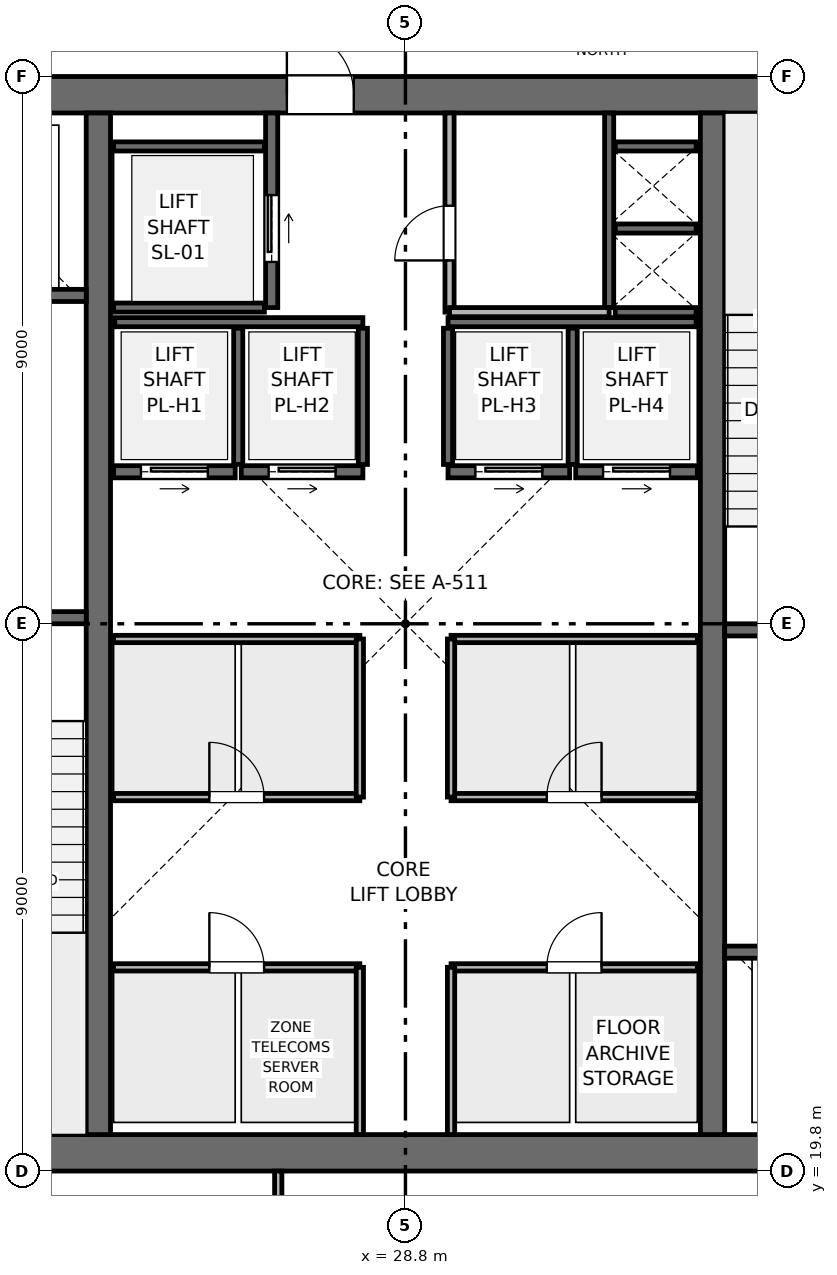
"""IFC4 building model, lengths in metres.
Left out: names, types, materials, properties, quantities, classifications, styles, units other than length and angle.
Written with IfcOpenShell. Run it as: python <this file> out.ifc"""

import sys

from ifc_helpers import new_model, si_unit, direction, frame, frame_2d, origin, place, context, subcontext, project, spatial, rectangle, extrude, element, fill, save


model = new_model("IFC4")
c1 = context("Model", 3, precision=1e-05, world=origin(), true_north=direction((0.0, 1.0)))
c2 = subcontext(c1, "Body", "Model", "MODEL_VIEW")
j1 = project(units=[si_unit("LENGTHUNIT", "METRE"), si_unit("PLANEANGLEUNIT", "RADIAN")], contexts=[c1])
p1 = place(None, origin())
s1 = spatial("IfcSite", under=j1, at=p1, CompositionType="ELEMENT")
p2 = place(p1, origin())
s2 = spatial("IfcBuilding", under=s1, at=p2, CompositionType="ELEMENT")
p3 = place(p2, frame((0.0, 0.0, 355.5)))
s3 = spatial("IfcBuildingStorey", under=s2, at=p3, CompositionType="ELEMENT", Elevation=355.5)
p4 = place(p3, frame((19.8, 20.1, 0.0), z_axis=(0.0, 0.0, 1.0), x_axis=(1.0, 0.0, 0.0)))
e1 = element("IfcWall", 1, at=p4, inside=s3, PredefinedType="SHEAR", context=c2, shape_type="SweptSolid", body=[
    extrude(rectangle(XDim=18.0, YDim=0.6, at=frame_2d((9.0, 0.0))), origin(), (0.0, 0.0, 1.0), 4.5),
])
p5 = place(p3, frame((19.8, 37.5, 0.0), z_axis=(0.0, 0.0, 1.0), x_axis=(1.0, 0.0, 0.0)))
e2 = element("IfcWall", 2, at=p5, inside=s3, PredefinedType="SHEAR", context=c2, shape_type="SweptSolid", body=[
    extrude(rectangle(XDim=18.0, YDim=0.6, at=frame_2d((9.0, 0.0))), origin(), (0.0, 0.0, 1.0), 4.5),
])
p6 = place(p5, frame((7.05, 0.0, 0.0)))
e3 = element("IfcOpeningElement", 3, at=p6, cuts=e2, PredefinedType="OPENING", context=c2, shape_type="SweptSolid", body=[
    extrude(rectangle(XDim=1.1, YDim=2.15, at=frame_2d((0.55, 1.075))), frame((0.0, 0.31, 0.0), z_axis=(0.0, -1.0, 0.0), x_axis=(1.0, 0.0, 0.0)), (0.0, 0.0, 1.0), 0.62),
])
for number, where, z_axis, x_axis in (
    (4, (23.75, 20.4, 0.0), (0.0, 0.0, 1.0), (0.0, 1.0, 0.0)),
    (5, (33.85, 20.4, 0.0), (0.0, 0.0, 1.0), (0.0, 1.0, 0.0)),
):
    element("IfcWall", number, at=place(p3, frame(where, z_axis=z_axis, x_axis=x_axis)), inside=s3, PredefinedType="SHEAR", context=c2, shape_type="SweptSolid", body=[
        extrude(rectangle(XDim=16.8, YDim=0.4, at=frame_2d((8.4, 0.0))), origin(), (0.0, 0.0, 1.0), 4.5),
    ])
p7 = place(p3, frame((20.4, 28.9, 0.0), z_axis=(0.0, 0.0, 1.0), x_axis=(1.0, 0.0, 0.0)))
e6 = element("IfcWall", 6, at=p7, inside=s3, PredefinedType="SHEAR", context=c2, shape_type="SweptSolid", body=[
    extrude(rectangle(XDim=3.15, YDim=0.2, at=frame_2d((1.575, 0.0))), origin(), (0.0, 0.0, 1.0), 4.24),
])
p8 = place(p7, frame((0.8, 0.0, 0.0)))
e7 = element("IfcOpeningElement", 7, at=p8, cuts=e6, PredefinedType="OPENING", context=c2, shape_type="SweptSolid", body=[
    extrude(rectangle(XDim=1.0, YDim=2.1, at=frame_2d((0.5, 1.05))), frame((0.0, 0.11, 0.0), z_axis=(0.0, -1.0, 0.0), x_axis=(1.0, 0.0, 0.0)), (0.0, 0.0, 1.0), 0.22),
])
p9 = place(p3, frame((34.05, 28.7, 0.0), z_axis=(0.0, 0.0, 1.0), x_axis=(1.0, 0.0, 0.0)))
e8 = element("IfcWall", 8, at=p9, inside=s3, PredefinedType="SHEAR", context=c2, shape_type="SweptSolid", body=[
    extrude(rectangle(XDim=3.15, YDim=0.2, at=frame_2d((1.575, 0.0))), origin(), (0.0, 0.0, 1.0), 4.24),
])
p10 = place(p9, frame((0.8, 0.0, 0.0)))
e9 = element("IfcOpeningElement", 9, at=p10, cuts=e8, PredefinedType="OPENING", context=c2, shape_type="SweptSolid", body=[
    extrude(rectangle(XDim=1.0, YDim=2.1, at=frame_2d((0.5, 1.05))), frame((0.0, 0.11, 0.0), z_axis=(0.0, -1.0, 0.0), x_axis=(1.0, 0.0, 0.0)), (0.0, 0.0, 1.0), 0.22),
])
p11 = place(p3, frame((32.15, 34.0, 0.0), z_axis=(0.0, 0.0, 1.0), x_axis=(0.0, 1.0, 0.0)))
e10 = element("IfcWall", 10, at=p11, inside=s3, PredefinedType="SHEAR", context=c2, shape_type="SweptSolid", body=[
    extrude(rectangle(XDim=3.2, YDim=0.15, at=frame_2d((1.6, 0.0))), origin(), (0.0, 0.0, 1.0), 4.24),
])
for number, where, z_axis, x_axis in (
    (11, (32.25, 33.925, 0.0), (0.0, 0.0, 1.0), (1.0, 0.0, 0.0)),
    (12, (32.25, 35.3, 0.0), (0.0, 0.0, 1.0), (1.0, 0.0, 0.0)),
):
    element("IfcWall", number, at=place(p3, frame(where, z_axis=z_axis, x_axis=x_axis)), inside=s3, PredefinedType="SHEAR", context=c2, shape_type="SweptSolid", body=[
        extrude(rectangle(XDim=1.33, YDim=0.15, at=frame_2d((0.665, 0.0))), origin(), (0.0, 0.0, 1.0), 4.24),
    ])
p12 = place(p3, frame((20.5, 34.2, 0.0), z_axis=(0.0, 0.0, 1.0), x_axis=(1.0, 0.0, 0.0)))
e13 = element("IfcWall", 13, at=p12, inside=s3, PredefinedType="SHEAR", context=c2, shape_type="SweptSolid", body=[
    extrude(rectangle(XDim=3.05, YDim=0.2, at=frame_2d((1.525, 0.0))), origin(), (0.0, 0.0, 1.0), 4.24),
])
p13 = place(p12, frame((0.75, 0.0, 0.0)))
e14 = element("IfcOpeningElement", 14, at=p13, cuts=e13, PredefinedType="OPENING", context=c2, shape_type="SweptSolid", body=[
    extrude(rectangle(XDim=1.1, YDim=2.15, at=frame_2d((0.55, 1.075))), frame((0.0, 0.11, 0.0), z_axis=(0.0, -1.0, 0.0), x_axis=(1.0, 0.0, 0.0)), (0.0, 0.0, 1.0), 0.22),
])
p14 = place(p3, frame((34.05, 23.4, 0.0), z_axis=(0.0, 0.0, 1.0), x_axis=(1.0, 0.0, 0.0)))
e15 = element("IfcWall", 15, at=p14, inside=s3, PredefinedType="SHEAR", context=c2, shape_type="SweptSolid", body=[
    extrude(rectangle(XDim=3.05, YDim=0.2, at=frame_2d((1.525, 0.0))), origin(), (0.0, 0.0, 1.0), 4.24),
])
p15 = place(p14, frame((1.2, 0.0, 0.0)))
e16 = element("IfcOpeningElement", 16, at=p15, cuts=e15, PredefinedType="OPENING", context=c2, shape_type="SweptSolid", body=[
    extrude(rectangle(XDim=1.1, YDim=2.15, at=frame_2d((0.55, 1.075))), frame((0.0, 0.11, 0.0), z_axis=(0.0, -1.0, 0.0), x_axis=(1.0, 0.0, 0.0)), (0.0, 0.0, 1.0), 0.22),
])
p16 = place(p3, frame((26.6, 34.0, 0.0), z_axis=(0.0, 0.0, 1.0), x_axis=(0.0, 1.0, 0.0)))
e17 = element("IfcWall", 17, at=p16, inside=s3, PredefinedType="SHEAR", context=c2, shape_type="SweptSolid", body=[
    extrude(rectangle(XDim=3.2, YDim=0.2, at=frame_2d((1.6, 0.0))), origin(), (0.0, 0.0, 1.0), 4.24),
])
p17 = place(p16, frame((0.75, 0.0, 0.0)))
e18 = element("IfcOpeningElement", 18, at=p17, cuts=e17, PredefinedType="OPENING", context=c2, shape_type="SweptSolid", body=[
    extrude(rectangle(XDim=1.1, YDim=2.15, at=frame_2d((0.55, 1.075))), frame((0.0, 0.11, 0.0), z_axis=(0.0, -1.0, 0.0), x_axis=(1.0, 0.0, 0.0)), (0.0, 0.0, 1.0), 0.22),
])
for number, where, z_axis, x_axis in (
    (19, (24.0, 34.0, 0.0), (0.0, 0.0, 1.0), (1.0, 0.0, 0.0)),
    (20, (24.0, 36.65, 0.0), (0.0, 0.0, 1.0), (1.0, 0.0, 0.0)),
):
    element("IfcWall", number, at=place(p3, frame(where, z_axis=z_axis, x_axis=x_axis)), inside=s3, PredefinedType="SHEAR", context=c2, shape_type="SweptSolid", body=[
        extrude(rectangle(XDim=2.48, YDim=0.15, at=frame_2d((1.24, 0.0))), origin(), (0.0, 0.0, 1.0), 4.24),
    ])
p18 = place(p3, frame((24.0, 31.3, 0.0), z_axis=(0.0, 0.0, 1.0), x_axis=(1.0, 0.0, 0.0)))
e21 = element("IfcWall", 21, at=p18, inside=s3, PredefinedType="SHEAR", context=c2, shape_type="SweptSolid", body=[
    extrude(rectangle(XDim=2.0, YDim=0.2, at=frame_2d((1.0, 0.0))), origin(), (0.0, 0.0, 1.0), 4.24),
])
p19 = place(p18, frame((0.45, 0.0, 0.0)))
e22 = element("IfcOpeningElement", 22, at=p19, cuts=e21, PredefinedType="OPENING", context=c2, shape_type="SweptSolid", body=[
    extrude(rectangle(XDim=1.1, YDim=2.15, at=frame_2d((0.55, 1.075))), frame((0.0, 0.11, 0.0), z_axis=(0.0, -1.0, 0.0), x_axis=(1.0, 0.0, 0.0)), (0.0, 0.0, 1.0), 0.22),
])
p20 = place(p3, frame((26.1, 31.3, 0.0), z_axis=(0.0, 0.0, 1.0), x_axis=(1.0, 0.0, 0.0)))
e23 = element("IfcWall", 23, at=p20, inside=s3, PredefinedType="SHEAR", context=c2, shape_type="SweptSolid", body=[
    extrude(rectangle(XDim=2.0, YDim=0.2, at=frame_2d((1.0, 0.0))), origin(), (0.0, 0.0, 1.0), 4.24),
])
p21 = place(p20, frame((0.45, 0.0, 0.0)))
e24 = element("IfcOpeningElement", 24, at=p21, cuts=e23, PredefinedType="OPENING", context=c2, shape_type="SweptSolid", body=[
    extrude(rectangle(XDim=1.1, YDim=2.15, at=frame_2d((0.55, 1.075))), frame((0.0, 0.11, 0.0), z_axis=(0.0, -1.0, 0.0), x_axis=(1.0, 0.0, 0.0)), (0.0, 0.0, 1.0), 0.22),
])
p22 = place(p3, frame((29.5, 31.3, 0.0), z_axis=(0.0, 0.0, 1.0), x_axis=(1.0, 0.0, 0.0)))
e25 = element("IfcWall", 25, at=p22, inside=s3, PredefinedType="SHEAR", context=c2, shape_type="SweptSolid", body=[
    extrude(rectangle(XDim=2.0, YDim=0.2, at=frame_2d((1.0, 0.0))), origin(), (0.0, 0.0, 1.0), 4.24),
])
p23 = place(p22, frame((0.45, 0.0, 0.0)))
e26 = element("IfcOpeningElement", 26, at=p23, cuts=e25, PredefinedType="OPENING", context=c2, shape_type="SweptSolid", body=[
    extrude(rectangle(XDim=1.1, YDim=2.15, at=frame_2d((0.55, 1.075))), frame((0.0, 0.11, 0.0), z_axis=(0.0, -1.0, 0.0), x_axis=(1.0, 0.0, 0.0)), (0.0, 0.0, 1.0), 0.22),
])
p24 = place(p3, frame((31.6, 31.3, 0.0), z_axis=(0.0, 0.0, 1.0), x_axis=(1.0, 0.0, 0.0)))
e27 = element("IfcWall", 27, at=p24, inside=s3, PredefinedType="SHEAR", context=c2, shape_type="SweptSolid", body=[
    extrude(rectangle(XDim=2.0, YDim=0.2, at=frame_2d((1.0, 0.0))), origin(), (0.0, 0.0, 1.0), 4.24),
])
p25 = place(p24, frame((0.45, 0.0, 0.0)))
e28 = element("IfcOpeningElement", 28, at=p25, cuts=e27, PredefinedType="OPENING", context=c2, shape_type="SweptSolid", body=[
    extrude(rectangle(XDim=1.1, YDim=2.15, at=frame_2d((0.55, 1.075))), frame((0.0, 0.11, 0.0), z_axis=(0.0, -1.0, 0.0), x_axis=(1.0, 0.0, 0.0)), (0.0, 0.0, 1.0), 0.22),
])
p26 = place(p3, frame((32.25, 36.65, 0.0), z_axis=(0.0, 0.0, 1.0), x_axis=(1.0, 0.0, 0.0)))
e29 = element("IfcWall", 29, at=p26, inside=s3, PredefinedType="SHEAR", context=c2, shape_type="SweptSolid", body=[
    extrude(rectangle(XDim=1.33, YDim=0.15, at=frame_2d((0.665, 0.0))), origin(), (0.0, 0.0, 1.0), 4.24),
])
for number, where, z_axis, x_axis in (
    (30, (24.02, 33.76, 0.0), (0.0, 0.0, 1.0), (1.0, 0.0, 0.0)),
    (31, (29.5, 33.76, 0.0), (0.0, 0.0, 1.0), (1.0, 0.0, 0.0)),
):
    element("IfcWall", number, at=place(p3, frame(where, z_axis=z_axis, x_axis=x_axis)), inside=s3, PredefinedType="SHEAR", context=c2, shape_type="SweptSolid", body=[
        extrude(rectangle(XDim=4.08, YDim=0.15, at=frame_2d((2.04, 0.0))), origin(), (0.0, 0.0, 1.0), 4.24),
    ])
for number, where, z_axis, x_axis in (
    (32, (26.05, 31.42, 0.0), (0.0, 0.0, 1.0), (0.0, 1.0, 0.0)),
    (33, (28.1, 31.42, 0.0), (0.0, 0.0, 1.0), (0.0, 1.0, 0.0)),
    (34, (29.5, 31.42, 0.0), (0.0, 0.0, 1.0), (0.0, 1.0, 0.0)),
    (35, (31.55, 31.42, 0.0), (0.0, 0.0, 1.0), (0.0, 1.0, 0.0)),
):
    element("IfcWall", number, at=place(p3, frame(where, z_axis=z_axis, x_axis=x_axis)), inside=s3, PredefinedType="SHEAR", context=c2, shape_type="SweptSolid", body=[
        extrude(rectangle(XDim=2.24, YDim=0.15, at=frame_2d((1.12, 0.0))), origin(), (0.0, 0.0, 1.0), 4.24),
    ])
p27 = place(p3, frame((29.525, 33.925, 0.0), z_axis=(0.0, 0.0, 1.0), x_axis=(0.0, 1.0, 0.0)))
e36 = element("IfcWall", 36, at=p27, inside=s3, PredefinedType="PARTITIONING", context=c2, shape_type="SweptSolid", body=[
    extrude(rectangle(XDim=3.275, YDim=0.15, at=frame_2d((1.637, 0.0))), origin(), (0.0, 0.0, 1.0), 4.24),
])
p28 = place(p27, frame((0.85, 0.0, 0.0)))
e37 = element("IfcOpeningElement", 37, at=p28, cuts=e36, PredefinedType="OPENING", context=c2, shape_type="SweptSolid", body=[
    extrude(rectangle(XDim=0.9, YDim=2.1, at=frame_2d((0.45, 1.05))), frame((0.0, 0.085, 0.0), z_axis=(0.0, -1.0, 0.0), x_axis=(1.0, 0.0, 0.0)), (0.0, 0.0, 1.0), 0.17),
])
p29 = place(p3, frame((29.525, 33.925, 0.0), z_axis=(0.0, 0.0, 1.0), x_axis=(1.0, 0.0, 0.0)))
e38 = element("IfcWall", 38, at=p29, inside=s3, PredefinedType="PARTITIONING", context=c2, shape_type="SweptSolid", body=[
    extrude(rectangle(XDim=2.625, YDim=0.15, at=frame_2d((1.312, 0.0))), origin(), (0.0, 0.0, 1.0), 4.24),
])
p30 = place(p3, frame((24.0, 23.15, 0.0), z_axis=(0.0, 0.0, 1.0), x_axis=(1.0, 0.0, 0.0)))
e39 = element("IfcWall", 39, at=p30, inside=s3, PredefinedType="PARTITIONING", context=c2, shape_type="SweptSolid", body=[
    extrude(rectangle(XDim=4.05, YDim=0.12, at=frame_2d((2.025, 0.0))), origin(), (0.0, 0.0, 1.0), 4.24),
])
p31 = place(p30, frame((1.575, 0.0, 0.0)))
e40 = element("IfcOpeningElement", 40, at=p31, cuts=e39, PredefinedType="OPENING", context=c2, shape_type="SweptSolid", body=[
    extrude(rectangle(XDim=0.9, YDim=2.1, at=frame_2d((0.45, 1.05))), frame((0.0, 0.07, 0.0), z_axis=(0.0, -1.0, 0.0), x_axis=(1.0, 0.0, 0.0)), (0.0, 0.0, 1.0), 0.14),
])
p32 = place(p3, frame((28.05, 20.4, 0.0), z_axis=(0.0, 0.0, 1.0), x_axis=(0.0, 1.0, 0.0)))
e41 = element("IfcWall", 41, at=p32, inside=s3, PredefinedType="PARTITIONING", context=c2, shape_type="SweptSolid", body=[
    extrude(rectangle(XDim=2.75, YDim=0.12, at=frame_2d((1.375, 0.0))), origin(), (0.0, 0.0, 1.0), 4.24),
])
p33 = place(p3, frame((29.55, 23.15, 0.0), z_axis=(0.0, 0.0, 1.0), x_axis=(1.0, 0.0, 0.0)))
e42 = element("IfcWall", 42, at=p33, inside=s3, PredefinedType="PARTITIONING", context=c2, shape_type="SweptSolid", body=[
    extrude(rectangle(XDim=4.05, YDim=0.12, at=frame_2d((2.025, 0.0))), origin(), (0.0, 0.0, 1.0), 4.24),
])
p34 = place(p33, frame((1.575, 0.0, 0.0)))
e43 = element("IfcOpeningElement", 43, at=p34, cuts=e42, PredefinedType="OPENING", context=c2, shape_type="SweptSolid", body=[
    extrude(rectangle(XDim=0.9, YDim=2.1, at=frame_2d((0.45, 1.05))), frame((0.0, 0.07, 0.0), z_axis=(0.0, -1.0, 0.0), x_axis=(1.0, 0.0, 0.0)), (0.0, 0.0, 1.0), 0.14),
])
p35 = place(p3, frame((29.55, 20.4, 0.0), z_axis=(0.0, 0.0, 1.0), x_axis=(0.0, 1.0, 0.0)))
e44 = element("IfcWall", 44, at=p35, inside=s3, PredefinedType="PARTITIONING", context=c2, shape_type="SweptSolid", body=[
    extrude(rectangle(XDim=2.75, YDim=0.12, at=frame_2d((1.375, 0.0))), origin(), (0.0, 0.0, 1.0), 4.24),
])
p36 = place(p3, frame((24.0, 25.95, 0.0), z_axis=(0.0, 0.0, 1.0), x_axis=(1.0, 0.0, 0.0)))
e45 = element("IfcWall", 45, at=p36, inside=s3, PredefinedType="PARTITIONING", context=c2, shape_type="SweptSolid", body=[
    extrude(rectangle(XDim=4.05, YDim=0.12, at=frame_2d((2.025, 0.0))), origin(), (0.0, 0.0, 1.0), 4.24),
])
p37 = place(p36, frame((1.575, 0.0, 0.0)))
e46 = element("IfcOpeningElement", 46, at=p37, cuts=e45, PredefinedType="OPENING", context=c2, shape_type="SweptSolid", body=[
    extrude(rectangle(XDim=0.9, YDim=2.1, at=frame_2d((0.45, 1.05))), frame((0.0, 0.07, 0.0), z_axis=(0.0, -1.0, 0.0), x_axis=(1.0, 0.0, 0.0)), (0.0, 0.0, 1.0), 0.14),
])
p38 = place(p3, frame((24.0, 28.55, 0.0), z_axis=(0.0, 0.0, 1.0), x_axis=(1.0, 0.0, 0.0)))
e47 = element("IfcWall", 47, at=p38, inside=s3, PredefinedType="PARTITIONING", context=c2, shape_type="SweptSolid", body=[
    extrude(rectangle(XDim=4.05, YDim=0.12, at=frame_2d((2.025, 0.0))), origin(), (0.0, 0.0, 1.0), 4.24),
])
p39 = place(p3, frame((28.05, 25.95, 0.0), z_axis=(0.0, 0.0, 1.0), x_axis=(0.0, 1.0, 0.0)))
e48 = element("IfcWall", 48, at=p39, inside=s3, PredefinedType="PARTITIONING", context=c2, shape_type="SweptSolid", body=[
    extrude(rectangle(XDim=2.6, YDim=0.12, at=frame_2d((1.3, 0.0))), origin(), (0.0, 0.0, 1.0), 4.24),
])
p40 = place(p3, frame((29.55, 25.95, 0.0), z_axis=(0.0, 0.0, 1.0), x_axis=(1.0, 0.0, 0.0)))
e49 = element("IfcWall", 49, at=p40, inside=s3, PredefinedType="PARTITIONING", context=c2, shape_type="SweptSolid", body=[
    extrude(rectangle(XDim=4.05, YDim=0.12, at=frame_2d((2.025, 0.0))), origin(), (0.0, 0.0, 1.0), 4.24),
])
p41 = place(p40, frame((1.575, 0.0, 0.0)))
e50 = element("IfcOpeningElement", 50, at=p41, cuts=e49, PredefinedType="OPENING", context=c2, shape_type="SweptSolid", body=[
    extrude(rectangle(XDim=0.9, YDim=2.1, at=frame_2d((0.45, 1.05))), frame((0.0, 0.07, 0.0), z_axis=(0.0, -1.0, 0.0), x_axis=(1.0, 0.0, 0.0)), (0.0, 0.0, 1.0), 0.14),
])
p42 = place(p3, frame((29.55, 28.55, 0.0), z_axis=(0.0, 0.0, 1.0), x_axis=(1.0, 0.0, 0.0)))
e51 = element("IfcWall", 51, at=p42, inside=s3, PredefinedType="PARTITIONING", context=c2, shape_type="SweptSolid", body=[
    extrude(rectangle(XDim=4.05, YDim=0.12, at=frame_2d((2.025, 0.0))), origin(), (0.0, 0.0, 1.0), 4.24),
])
p43 = place(p3, frame((29.55, 25.95, 0.0), z_axis=(0.0, 0.0, 1.0), x_axis=(0.0, 1.0, 0.0)))
e52 = element("IfcWall", 52, at=p43, inside=s3, PredefinedType="PARTITIONING", context=c2, shape_type="SweptSolid", body=[
    extrude(rectangle(XDim=2.6, YDim=0.12, at=frame_2d((1.3, 0.0))), origin(), (0.0, 0.0, 1.0), 4.24),
])
p44 = place(p3, frame((26.708, 8.53, 0.0), z_axis=(0.0, 0.0, 1.0), x_axis=(0.0, 1.0, 0.0)))
e53 = element("IfcWall", 53, at=p44, inside=s3, PredefinedType="PARTITIONING", context=c2, shape_type="SweptSolid", body=[
    extrude(rectangle(XDim=11.27, YDim=0.12, at=frame_2d((5.635, 0.0))), origin(), (0.0, 0.0, 1.0), 3.865),
])
p45 = place(p44, frame((8.87, 0.0, 0.0)))
e54 = element("IfcOpeningElement", 54, at=p45, cuts=e53, PredefinedType="OPENING", context=c2, shape_type="SweptSolid", body=[
    extrude(rectangle(XDim=0.9, YDim=2.1, at=frame_2d((0.45, 1.05))), frame((0.0, 0.07, 0.0), z_axis=(0.0, -1.0, 0.0), x_axis=(1.0, 0.0, 0.0)), (0.0, 0.0, 1.0), 0.14),
])
p46 = place(p17, origin())
e55 = element("IfcDoor", 55, at=p46, inside=s3, OperationType="SLIDING_TO_RIGHT", PredefinedType="DOOR", context=c2, shape_type="SweptSolid", body=[
    extrude(rectangle(XDim=1.1, YDim=2.15, at=frame_2d((0.55, 1.075))), frame((0.0, 0.025, 0.0), z_axis=(0.0, -1.0, 0.0), x_axis=(1.0, 0.0, 0.0)), (0.0, 0.0, 1.0), 0.05),
])
fill(e18, e55)
p47 = place(p19, origin())
e56 = element("IfcDoor", 56, at=p47, inside=s3, OperationType="SLIDING_TO_RIGHT", PredefinedType="DOOR", context=c2, shape_type="SweptSolid", body=[
    extrude(rectangle(XDim=1.1, YDim=2.15, at=frame_2d((0.55, 1.075))), frame((0.0, 0.025, 0.0), z_axis=(0.0, -1.0, 0.0), x_axis=(1.0, 0.0, 0.0)), (0.0, 0.0, 1.0), 0.05),
])
fill(e22, e56)
p48 = place(p21, origin())
e57 = element("IfcDoor", 57, at=p48, inside=s3, OperationType="SLIDING_TO_RIGHT", PredefinedType="DOOR", context=c2, shape_type="SweptSolid", body=[
    extrude(rectangle(XDim=1.1, YDim=2.15, at=frame_2d((0.55, 1.075))), frame((0.0, 0.025, 0.0), z_axis=(0.0, -1.0, 0.0), x_axis=(1.0, 0.0, 0.0)), (0.0, 0.0, 1.0), 0.05),
])
fill(e24, e57)
p49 = place(p23, origin())
e58 = element("IfcDoor", 58, at=p49, inside=s3, OperationType="SLIDING_TO_RIGHT", PredefinedType="DOOR", context=c2, shape_type="SweptSolid", body=[
    extrude(rectangle(XDim=1.1, YDim=2.15, at=frame_2d((0.55, 1.075))), frame((0.0, 0.025, 0.0), z_axis=(0.0, -1.0, 0.0), x_axis=(1.0, 0.0, 0.0)), (0.0, 0.0, 1.0), 0.05),
])
fill(e26, e58)
p50 = place(p25, origin())
e59 = element("IfcDoor", 59, at=p50, inside=s3, OperationType="SLIDING_TO_RIGHT", PredefinedType="DOOR", context=c2, shape_type="SweptSolid", body=[
    extrude(rectangle(XDim=1.1, YDim=2.15, at=frame_2d((0.55, 1.075))), frame((0.0, 0.025, 0.0), z_axis=(0.0, -1.0, 0.0), x_axis=(1.0, 0.0, 0.0)), (0.0, 0.0, 1.0), 0.05),
])
fill(e28, e59)
p51 = place(p28, origin())
e60 = element("IfcDoor", 60, at=p51, inside=s3, OperationType="SINGLE_SWING_LEFT", PredefinedType="DOOR", context=c2, shape_type="SweptSolid", body=[
    extrude(rectangle(XDim=0.9, YDim=2.1, at=frame_2d((0.45, 1.05))), frame((0.0, 0.025, 0.0), z_axis=(0.0, -1.0, 0.0), x_axis=(1.0, 0.0, 0.0)), (0.0, 0.0, 1.0), 0.05),
])
fill(e37, e60)
p52 = place(p31, origin())
e61 = element("IfcDoor", 61, at=p52, inside=s3, OperationType="SINGLE_SWING_LEFT", PredefinedType="DOOR", context=c2, shape_type="SweptSolid", body=[
    extrude(rectangle(XDim=0.9, YDim=2.1, at=frame_2d((0.45, 1.05))), frame((0.0, 0.025, 0.0), z_axis=(0.0, -1.0, 0.0), x_axis=(1.0, 0.0, 0.0)), (0.0, 0.0, 1.0), 0.05),
])
fill(e40, e61)
p53 = place(p34, origin())
e62 = element("IfcDoor", 62, at=p53, inside=s3, OperationType="SINGLE_SWING_RIGHT", PredefinedType="DOOR", context=c2, shape_type="SweptSolid", body=[
    extrude(rectangle(XDim=0.9, YDim=2.1, at=frame_2d((0.45, 1.05))), frame((0.0, 0.025, 0.0), z_axis=(0.0, -1.0, 0.0), x_axis=(1.0, 0.0, 0.0)), (0.0, 0.0, 1.0), 0.05),
])
fill(e43, e62)
p54 = place(p37, origin())
e63 = element("IfcDoor", 63, at=p54, inside=s3, OperationType="SINGLE_SWING_LEFT", PredefinedType="DOOR", context=c2, shape_type="SweptSolid", body=[
    extrude(rectangle(XDim=0.9, YDim=2.1, at=frame_2d((0.45, 1.05))), frame((0.0, 0.025, 0.0), z_axis=(0.0, -1.0, 0.0), x_axis=(1.0, 0.0, 0.0)), (0.0, 0.0, 1.0), 0.05),
])
fill(e46, e63)
p55 = place(p41, origin())
e64 = element("IfcDoor", 64, at=p55, inside=s3, OperationType="SINGLE_SWING_RIGHT", PredefinedType="DOOR", context=c2, shape_type="SweptSolid", body=[
    extrude(rectangle(XDim=0.9, YDim=2.1, at=frame_2d((0.45, 1.05))), frame((0.0, 0.025, 0.0), z_axis=(0.0, -1.0, 0.0), x_axis=(1.0, 0.0, 0.0)), (0.0, 0.0, 1.0), 0.05),
])
fill(e50, e64)
p56 = place(p6, origin())
e65 = element("IfcDoor", 65, at=p56, inside=s3, OperationType="SINGLE_SWING_LEFT", PredefinedType="DOOR", context=c2, shape_type="SweptSolid", body=[
    extrude(rectangle(XDim=1.1, YDim=2.15, at=frame_2d((0.55, 1.075))), frame((0.0, 0.025, 0.0), z_axis=(0.0, -1.0, 0.0), x_axis=(1.0, 0.0, 0.0)), (0.0, 0.0, 1.0), 0.05),
])
fill(e3, e65)
save(model, sys.argv[1])
